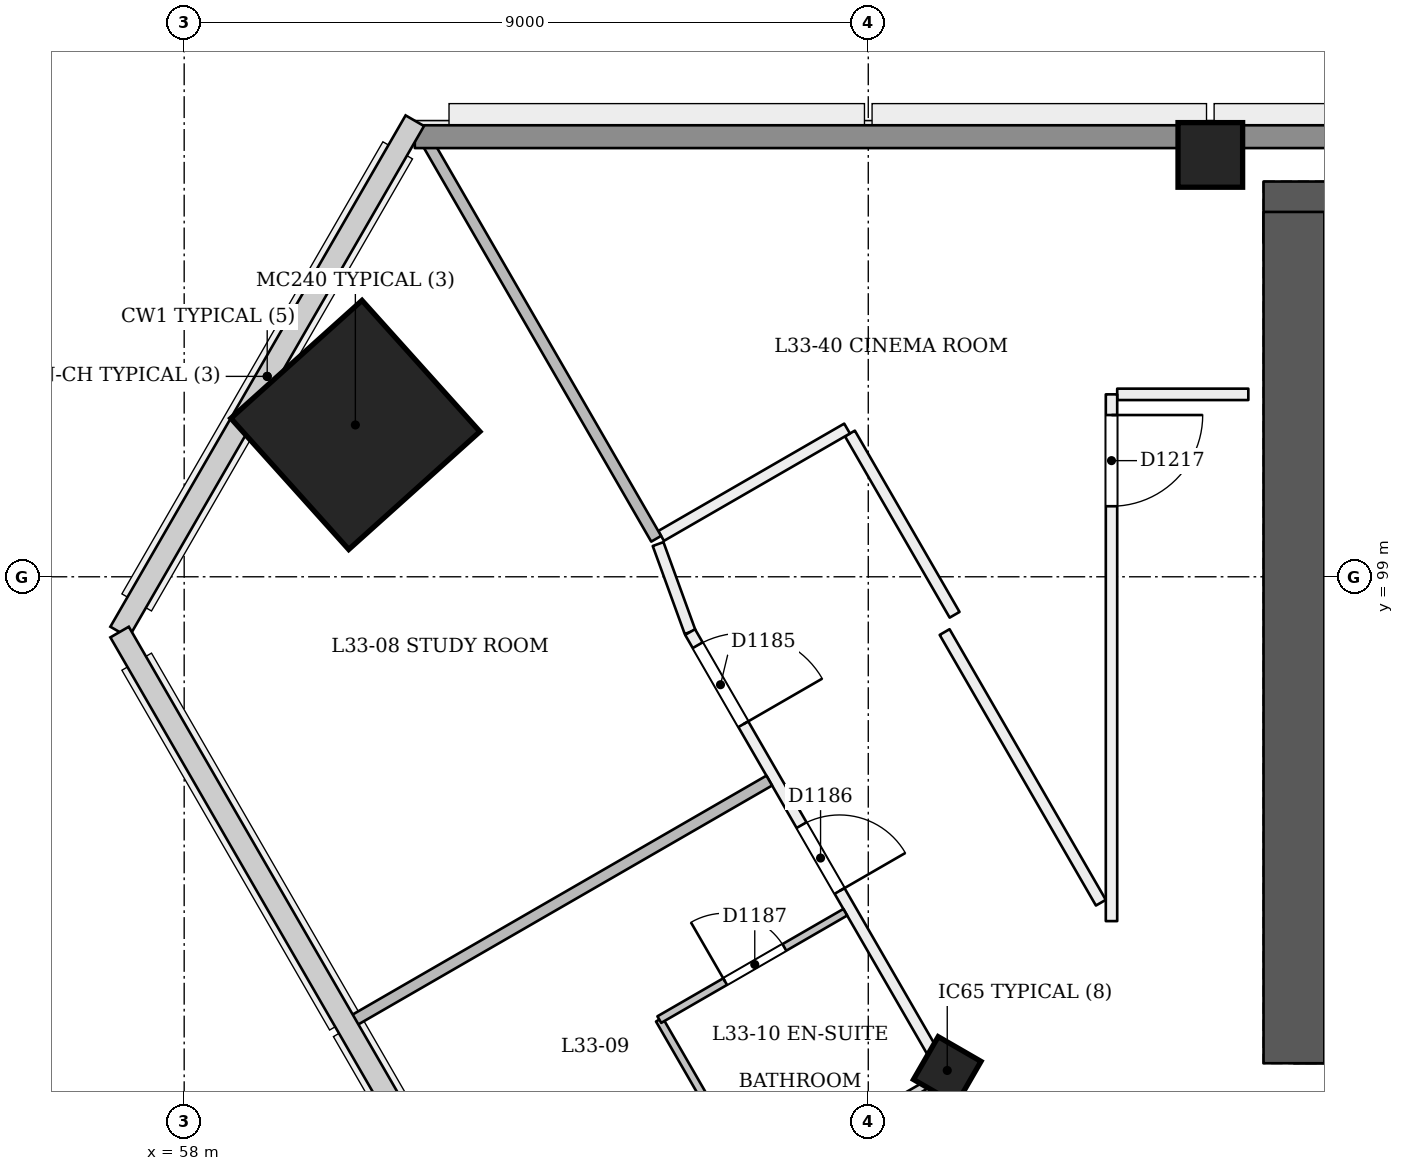
"""IFC4 building model, lengths in metres.
Left out: names, types, materials, properties, quantities, classifications, styles, units other than length and angle.
Written with IfcOpenShell. Run it as: python <this file> out.ifc"""

import sys

from ifc_helpers import new_model, si_unit, direction, frame, frame_2d, origin, origin_2d, place, context, subcontext, project, spatial, rectangle, extrude, element, fill, save


model = new_model("IFC4")
c1 = context("Model", 3, precision=1e-05, world=origin(), true_north=direction((0.0, 1.0)))
c2 = subcontext(c1, "Body", "Model", "MODEL_VIEW")
j1 = project(units=[si_unit("LENGTHUNIT", "METRE"), si_unit("PLANEANGLEUNIT", "RADIAN")], contexts=[c1])
p1 = place(None, origin())
s1 = spatial("IfcSite", under=j1, at=p1, CompositionType="ELEMENT")
p2 = place(p1, origin())
s2 = spatial("IfcBuilding", under=s1, at=p2, CompositionType="ELEMENT")
p3 = place(p2, frame((0.0, 0.0, 131.4)))
s3 = spatial("IfcBuildingStorey", under=s2, at=p3, CompositionType="ELEMENT", Elevation=131.4)
p4 = place(p3, frame((72.6, 93.0, 0.0), z_axis=(0.0, 0.0, 1.0), x_axis=(1.0, 0.0, 0.0)))
e1 = element("IfcWall", 1, at=p4, inside=s3, PredefinedType="SHEAR", context=c2, shape_type="SweptSolid", body=[
    extrude(rectangle(XDim=25.2, YDim=0.8, at=frame_2d((12.6, 0.0))), origin(), (0.0, 0.0, 1.0), 3.6),
])
p5 = place(p4, frame((1.2, 0.0, 0.0)))
e2 = element("IfcOpeningElement", 2, at=p5, cuts=e1, PredefinedType="OPENING", context=c2, shape_type="SweptSolid", body=[
    extrude(rectangle(XDim=1.2, YDim=2.1, at=frame_2d((0.6, 1.05))), frame((0.0, 0.411, 0.0), z_axis=(0.0, -1.0, 0.0), x_axis=(1.0, 0.0, 0.0)), (0.0, 0.0, 1.0), 0.821),
])
p6 = place(p4, frame((3.4, 0.0, 0.0)))
e3 = element("IfcOpeningElement", 3, at=p6, cuts=e1, PredefinedType="OPENING", context=c2, shape_type="SweptSolid", body=[
    extrude(rectangle(XDim=1.2, YDim=2.1, at=frame_2d((0.6, 1.05))), frame((0.0, 0.411, 0.0), z_axis=(0.0, -1.0, 0.0), x_axis=(1.0, 0.0, 0.0)), (0.0, 0.0, 1.0), 0.821),
])
p7 = place(p4, frame((13.4, 0.0, 0.0)))
e4 = element("IfcOpeningElement", 4, at=p7, cuts=e1, PredefinedType="OPENING", context=c2, shape_type="SweptSolid", body=[
    extrude(rectangle(XDim=1.2, YDim=2.1, at=frame_2d((0.6, 1.05))), frame((0.0, 0.411, 0.0), z_axis=(0.0, -1.0, 0.0), x_axis=(1.0, 0.0, 0.0)), (0.0, 0.0, 1.0), 0.821),
])
p8 = place(p4, frame((16.062, 0.0, 0.0)))
e5 = element("IfcOpeningElement", 5, at=p8, cuts=e1, PredefinedType="OPENING", context=c2, shape_type="SweptSolid", body=[
    extrude(rectangle(XDim=1.0, YDim=2.1, at=frame_2d((0.5, 1.05))), frame((0.0, 0.411, 0.0), z_axis=(0.0, -1.0, 0.0), x_axis=(1.0, 0.0, 0.0)), (0.0, 0.0, 1.0), 0.821),
])
p9 = place(p4, frame((18.85, 0.0, 0.0)))
e6 = element("IfcOpeningElement", 6, at=p9, cuts=e1, PredefinedType="OPENING", context=c2, shape_type="SweptSolid", body=[
    extrude(rectangle(XDim=1.0, YDim=2.1, at=frame_2d((0.5, 1.05))), frame((0.0, 0.411, 0.0), z_axis=(0.0, -1.0, 0.0), x_axis=(1.0, 0.0, 0.0)), (0.0, 0.0, 1.0), 0.821),
])
p10 = place(p4, frame((22.038, 0.0, 0.0)))
e7 = element("IfcOpeningElement", 7, at=p10, cuts=e1, PredefinedType="OPENING", context=c2, shape_type="SweptSolid", body=[
    extrude(rectangle(XDim=1.0, YDim=2.1, at=frame_2d((0.5, 1.05))), frame((0.0, 0.411, 0.0), z_axis=(0.0, -1.0, 0.0), x_axis=(1.0, 0.0, 0.0)), (0.0, 0.0, 1.0), 0.821),
])
p11 = place(p3, frame((97.4, 103.8, 0.0), z_axis=(0.0, 0.0, 1.0), x_axis=(-1.0, 0.0, 0.0)))
e8 = element("IfcWall", 8, at=p11, inside=s3, PredefinedType="SHEAR", context=c2, shape_type="SweptSolid", body=[
    extrude(rectangle(XDim=25.2, YDim=0.8, at=frame_2d((12.6, 0.0))), origin(), (0.0, 0.0, 1.0), 3.6),
])
p12 = place(p3, frame((72.6, 103.8, 0.0), z_axis=(0.0, 0.0, 1.0), x_axis=(0.0, -1.0, 0.0)))
e9 = element("IfcWall", 9, at=p12, inside=s3, PredefinedType="SHEAR", context=c2, shape_type="SweptSolid", body=[
    extrude(rectangle(XDim=11.2, YDim=0.8, at=frame_2d((5.6, 0.0))), origin(), (0.0, 0.0, 1.0), 3.6),
])
p13 = place(p3, frame((68.012, 92.458, -0.02), z_axis=(0.02215519141, 0.038415882353, 0.999016199807), x_axis=(-0.86536461293, -0.499669007942, 0.038405327632)))
e10 = element("IfcColumn", 10, at=p13, inside=s3, PredefinedType="COLUMN", context=c2, shape_type="SweptSolid", body=[
    extrude(rectangle(XDim=0.65, YDim=0.65, at=origin_2d()), origin(), (0.0, 0.0, 1.0), 3.604),
])
p14 = place(p3, frame((60.218, 100.986, 0.0), z_axis=(0.028401796786, 0.009286506348, 0.999553449666), x_axis=(-0.866201915964, 0.499294786535, 0.019973905943)))
e11 = element("IfcColumn", 11, at=p14, inside=s3, PredefinedType="COLUMN", context=c2, shape_type="SweptSolid", body=[
    extrude(rectangle(XDim=2.32, YDim=2.32, at=origin_2d()), origin(), (0.0, 0.0, 1.0), 3.602),
])
p15 = place(p3, frame((71.5, 104.55, 0.0), z_axis=(0.0, 0.0, 1.0), x_axis=(1.0, 0.0, 0.0)))
e12 = element("IfcColumn", 12, at=p15, inside=s3, PredefinedType="COLUMN", context=c2, shape_type="SweptSolid", body=[
    extrude(rectangle(XDim=0.85, YDim=0.85, at=origin_2d()), origin(), (0.0, 0.0, 1.0), 3.6),
])
p16 = place(p3, frame((64.235, 99.431, 0.0), z_axis=(0.0, 0.0, 1.0), x_axis=(0.341679410068, -0.9398165676, 0.0)))
e13 = element("IfcWall", 13, at=p16, inside=s3, PredefinedType="PARTITIONING", context=c2, shape_type="SweptSolid", body=[
    extrude(rectangle(XDim=1.232, YDim=0.15, at=frame_2d((0.616, 0.0))), origin(), (0.0, 0.0, 1.0), 3.15),
])
p17 = place(p3, frame((64.656, 98.273, 0.0), z_axis=(0.0, 0.0, 1.0), x_axis=(0.500001784794, -0.866024373331, 0.0)))
e14 = element("IfcWall", 14, at=p17, inside=s3, PredefinedType="PARTITIONING", context=c2, shape_type="SweptSolid", body=[
    extrude(rectangle(XDim=40.426, YDim=0.15, at=frame_2d((20.213, 0.0))), origin(), (0.0, 0.0, 1.0), 2.75),
])
p18 = place(p17, frame((0.2, 0.0, 0.0)))
e15 = element("IfcOpeningElement", 15, at=p18, cuts=e14, PredefinedType="OPENING", context=c2, shape_type="SweptSolid", body=[
    extrude(rectangle(XDim=1.2, YDim=2.1, at=frame_2d((0.6, 1.05))), frame((0.0, 0.085, 0.0), z_axis=(0.0, -1.0, 0.0), x_axis=(1.0, 0.0, 0.0)), (0.0, 0.0, 1.0), 0.171),
])
p19 = place(p17, frame((2.933, 0.0, 0.0)))
e16 = element("IfcOpeningElement", 16, at=p19, cuts=e14, PredefinedType="OPENING", context=c2, shape_type="SweptSolid", body=[
    extrude(rectangle(XDim=1.0, YDim=2.1, at=frame_2d((0.5, 1.05))), frame((0.0, 0.085, 0.0), z_axis=(0.0, -1.0, 0.0), x_axis=(1.0, 0.0, 0.0)), (0.0, 0.0, 1.0), 0.171),
])
p20 = place(p17, frame((9.608, 0.0, 0.0)))
e17 = element("IfcOpeningElement", 17, at=p20, cuts=e14, PredefinedType="OPENING", context=c2, shape_type="SweptSolid", body=[
    extrude(rectangle(XDim=1.0, YDim=2.1, at=frame_2d((0.5, 1.05))), frame((0.0, 0.085, 0.0), z_axis=(0.0, -1.0, 0.0), x_axis=(1.0, 0.0, 0.0)), (0.0, 0.0, 1.0), 0.171),
])
p21 = place(p17, frame((11.818, 0.0, 0.0)))
e18 = element("IfcOpeningElement", 18, at=p21, cuts=e14, PredefinedType="OPENING", context=c2, shape_type="SweptSolid", body=[
    extrude(rectangle(XDim=1.0, YDim=2.1, at=frame_2d((0.5, 1.05))), frame((0.0, 0.085, 0.0), z_axis=(0.0, -1.0, 0.0), x_axis=(1.0, 0.0, 0.0)), (0.0, 0.0, 1.0), 0.171),
])
p22 = place(p17, frame((18.493, 0.0, 0.0)))
e19 = element("IfcOpeningElement", 19, at=p22, cuts=e14, PredefinedType="OPENING", context=c2, shape_type="SweptSolid", body=[
    extrude(rectangle(XDim=1.0, YDim=2.1, at=frame_2d((0.5, 1.05))), frame((0.0, 0.085, 0.0), z_axis=(0.0, -1.0, 0.0), x_axis=(1.0, 0.0, 0.0)), (0.0, 0.0, 1.0), 0.171),
])
p23 = place(p17, frame((21.963, 0.0, 0.0)))
e20 = element("IfcOpeningElement", 20, at=p23, cuts=e14, PredefinedType="OPENING", context=c2, shape_type="SweptSolid", body=[
    extrude(rectangle(XDim=1.0, YDim=2.1, at=frame_2d((0.5, 1.05))), frame((0.0, 0.085, 0.0), z_axis=(0.0, -1.0, 0.0), x_axis=(1.0, 0.0, 0.0)), (0.0, 0.0, 1.0), 0.171),
])
p24 = place(p17, frame((27.493, 0.0, 0.0)))
e21 = element("IfcOpeningElement", 21, at=p24, cuts=e14, PredefinedType="OPENING", context=c2, shape_type="SweptSolid", body=[
    extrude(rectangle(XDim=1.0, YDim=2.1, at=frame_2d((0.5, 1.05))), frame((0.0, 0.085, 0.0), z_axis=(0.0, -1.0, 0.0), x_axis=(1.0, 0.0, 0.0)), (0.0, 0.0, 1.0), 0.171),
])
p25 = place(p17, frame((30.963, 0.0, 0.0)))
e22 = element("IfcOpeningElement", 22, at=p25, cuts=e14, PredefinedType="OPENING", context=c2, shape_type="SweptSolid", body=[
    extrude(rectangle(XDim=1.0, YDim=2.1, at=frame_2d((0.5, 1.05))), frame((0.0, 0.085, 0.0), z_axis=(0.0, -1.0, 0.0), x_axis=(1.0, 0.0, 0.0)), (0.0, 0.0, 1.0), 0.171),
])
p26 = place(p17, frame((36.493, 0.0, 0.0)))
e23 = element("IfcOpeningElement", 23, at=p26, cuts=e14, PredefinedType="OPENING", context=c2, shape_type="SweptSolid", body=[
    extrude(rectangle(XDim=1.0, YDim=2.1, at=frame_2d((0.5, 1.05))), frame((0.0, 0.085, 0.0), z_axis=(0.0, -1.0, 0.0), x_axis=(1.0, 0.0, 0.0)), (0.0, 0.0, 1.0), 0.171),
])
p27 = place(p17, frame((39.101, 0.0, 0.0)))
e24 = element("IfcOpeningElement", 24, at=p27, cuts=e14, PredefinedType="OPENING", context=c2, shape_type="SweptSolid", body=[
    extrude(rectangle(XDim=1.0, YDim=2.1, at=frame_2d((0.5, 1.05))), frame((0.0, 0.085, 0.0), z_axis=(0.0, -1.0, 0.0), x_axis=(1.0, 0.0, 0.0)), (0.0, 0.0, 1.0), 0.171),
])
p28 = place(p3, frame((72.0, 101.4, 0.0), z_axis=(0.0, 0.0, 1.0), x_axis=(-1.0, 0.0, 0.0)))
e25 = element("IfcWall", 25, at=p28, inside=s3, PredefinedType="PARTITIONING", context=c2, shape_type="SweptSolid", body=[
    extrude(rectangle(XDim=1.725, YDim=0.15, at=frame_2d((0.863, 0.0))), origin(), (0.0, 0.0, 1.0), 3.15),
])
p29 = place(p3, frame((70.2, 101.4, 0.0), z_axis=(0.0, 0.0, 1.0), x_axis=(0.0, -1.0, 0.0)))
e26 = element("IfcWall", 26, at=p29, inside=s3, PredefinedType="PARTITIONING", context=c2, shape_type="SweptSolid", body=[
    extrude(rectangle(XDim=6.93, YDim=0.15, at=frame_2d((3.465, 0.0))), origin(), (0.0, 0.0, 1.0), 3.15),
])
p30 = place(p29, frame((0.272, 0.0, 0.0)))
e27 = element("IfcOpeningElement", 27, at=p30, cuts=e26, PredefinedType="OPENING", context=c2, shape_type="SweptSolid", body=[
    extrude(rectangle(XDim=1.2, YDim=2.1, at=frame_2d((0.6, 1.05))), frame((0.0, 0.085, 0.0), z_axis=(0.0, -1.0, 0.0), x_axis=(1.0, 0.0, 0.0)), (0.0, 0.0, 1.0), 0.171),
])
p31 = place(p3, frame((70.06, 94.712, 0.0), z_axis=(0.0, 0.0, 1.0), x_axis=(-0.499996600708, 0.866027366358, 0.0)))
e28 = element("IfcWall", 28, at=p31, inside=s3, PredefinedType="PARTITIONING", context=c2, shape_type="SweptSolid", body=[
    extrude(rectangle(XDim=4.111, YDim=0.15, at=frame_2d((2.056, 0.0))), origin(), (0.0, 0.0, 1.0), 3.15),
])
p32 = place(p3, frame((68.135, 98.5, 0.0), z_axis=(0.0, 0.0, 1.0), x_axis=(-0.499991038717, 0.866030577522, 0.0)))
e29 = element("IfcWall", 29, at=p32, inside=s3, PredefinedType="PARTITIONING", context=c2, shape_type="SweptSolid", body=[
    extrude(rectangle(XDim=2.754, YDim=0.15, at=frame_2d((1.377, 0.0))), origin(), (0.0, 0.0, 1.0), 3.15),
])
p33 = place(p3, frame((66.721, 100.95, 0.0), z_axis=(0.0, 0.0, 1.0), x_axis=(-0.866048868473, -0.499959355765, 0.0)))
e30 = element("IfcWall", 30, at=p33, inside=s3, PredefinedType="PARTITIONING", context=c2, shape_type="SweptSolid", body=[
    extrude(rectangle(XDim=2.825, YDim=0.15, at=frame_2d((1.413, 0.0))), origin(), (0.0, 0.0, 1.0), 3.15),
])
p34 = place(p3, frame((60.202, 93.146, 0.0), z_axis=(0.0, 0.0, 1.0), x_axis=(0.866025401434, 0.500000004071, 0.0)))
e31 = element("IfcWall", 31, at=p34, inside=s3, PredefinedType="PARTITIONING", context=c2, shape_type="SweptSolid", body=[
    extrude(rectangle(XDim=6.345, YDim=0.15, at=frame_2d((3.173, 0.0))), origin(), (0.0, 0.0, 1.0), 2.65),
])
p35 = place(p3, frame((64.21, 99.5, 0.0), z_axis=(0.0, 0.0, 1.0), x_axis=(-0.500004896655, 0.866022576681, 0.0)))
e32 = element("IfcWall", 32, at=p35, inside=s3, PredefinedType="PARTITIONING", context=c2, shape_type="SweptSolid", body=[
    extrude(rectangle(XDim=6.235, YDim=0.15, at=frame_2d((3.118, 0.0))), origin(), (0.0, 0.0, 1.0), 2.65),
])
p36 = place(p3, frame((65.501, 91.009, 0.0), z_axis=(0.0, 0.0, 1.0), x_axis=(-0.500004234368, 0.866022959057, 0.0)))
e33 = element("IfcWall", 33, at=p36, inside=s3, PredefinedType="PARTITIONING", context=c2, shape_type="SweptSolid", body=[
    extrude(rectangle(XDim=2.5, YDim=0.1, at=frame_2d((1.25, 0.0))), origin(), (0.0, 0.0, 1.0), 2.75),
])
p37 = place(p3, frame((64.251, 93.174, 0.0), z_axis=(0.0, 0.0, 1.0), x_axis=(0.866027263711, 0.4999967785, 0.0)))
e34 = element("IfcWall", 34, at=p37, inside=s3, PredefinedType="PARTITIONING", context=c2, shape_type="SweptSolid", body=[
    extrude(rectangle(XDim=2.825, YDim=0.1, at=frame_2d((1.412, 0.0))), origin(), (0.0, 0.0, 1.0), 3.15),
])
p38 = place(p37, frame((1.0, 0.0, 0.0)))
e35 = element("IfcOpeningElement", 35, at=p38, cuts=e34, PredefinedType="OPENING", context=c2, shape_type="SweptSolid", body=[
    extrude(rectangle(XDim=0.9, YDim=2.1, at=frame_2d((0.45, 1.05))), frame((0.0, 0.061, 0.0), z_axis=(0.0, -1.0, 0.0), x_axis=(1.0, 0.0, 0.0)), (0.0, 0.0, 1.0), 0.121),
])
p39 = place(p3, frame((65.484, 90.999, 0.0), z_axis=(0.0, 0.0, 1.0), x_axis=(0.866026948466, 0.499997324523, 0.0)))
e36 = element("IfcWall", 36, at=p39, inside=s3, PredefinedType="PARTITIONING", context=c2, shape_type="SweptSolid", body=[
    extrude(rectangle(XDim=2.845, YDim=0.1, at=frame_2d((1.422, 0.0))), origin(), (0.0, 0.0, 1.0), 2.75),
])
p40 = place(p3, frame((61.034, 104.79, 0.0), z_axis=(0.0, 0.0, 1.0), x_axis=(1.0, 0.0, 0.0)))
e37 = element("IfcWall", 37, at=p40, inside=s3, PredefinedType="SOLIDWALL", context=c2, shape_type="SweptSolid", body=[
    extrude(rectangle(XDim=47.932, YDim=0.3, at=frame_2d((23.966, 0.0))), origin(), (0.0, 0.0, 1.0), 2.65),
])
p41 = place(p18, origin())
e38 = element("IfcDoor", 38, at=p41, inside=s3, OperationType="SINGLE_SWING_RIGHT", PredefinedType="NOTDEFINED", context=c2, shape_type="SweptSolid", body=[
    extrude(rectangle(XDim=1.2, YDim=2.1, at=frame_2d((0.6, 1.05))), frame((0.0, 0.025, 0.0), z_axis=(0.0, -1.0, 0.0), x_axis=(1.0, 0.0, 0.0)), (0.0, 0.0, 1.0), 0.05),
])
fill(e15, e38)
p42 = place(p19, origin())
e39 = element("IfcDoor", 39, at=p42, inside=s3, OperationType="SINGLE_SWING_RIGHT", PredefinedType="NOTDEFINED", context=c2, shape_type="SweptSolid", body=[
    extrude(rectangle(XDim=1.0, YDim=2.1, at=frame_2d((0.5, 1.05))), frame((0.0, 0.025, 0.0), z_axis=(0.0, -1.0, 0.0), x_axis=(1.0, 0.0, 0.0)), (0.0, 0.0, 1.0), 0.05),
])
fill(e16, e39)
p43 = place(p38, origin())
e40 = element("IfcDoor", 40, at=p43, inside=s3, OperationType="SINGLE_SWING_LEFT", PredefinedType="NOTDEFINED", context=c2, shape_type="SweptSolid", body=[
    extrude(rectangle(XDim=0.9, YDim=2.1, at=frame_2d((0.45, 1.05))), frame((0.0, 0.025, 0.0), z_axis=(0.0, -1.0, 0.0), x_axis=(1.0, 0.0, 0.0)), (0.0, 0.0, 1.0), 0.05),
])
fill(e35, e40)
p44 = place(p30, origin())
e41 = element("IfcDoor", 41, at=p44, inside=s3, OperationType="SINGLE_SWING_LEFT", PredefinedType="NOTDEFINED", context=c2, shape_type="SweptSolid", body=[
    extrude(rectangle(XDim=1.2, YDim=2.1, at=frame_2d((0.6, 1.05))), frame((0.0, 0.025, 0.0), z_axis=(0.0, -1.0, 0.0), x_axis=(1.0, 0.0, 0.0)), (0.0, 0.0, 1.0), 0.05),
])
fill(e27, e41)
save(model, sys.argv[1])
